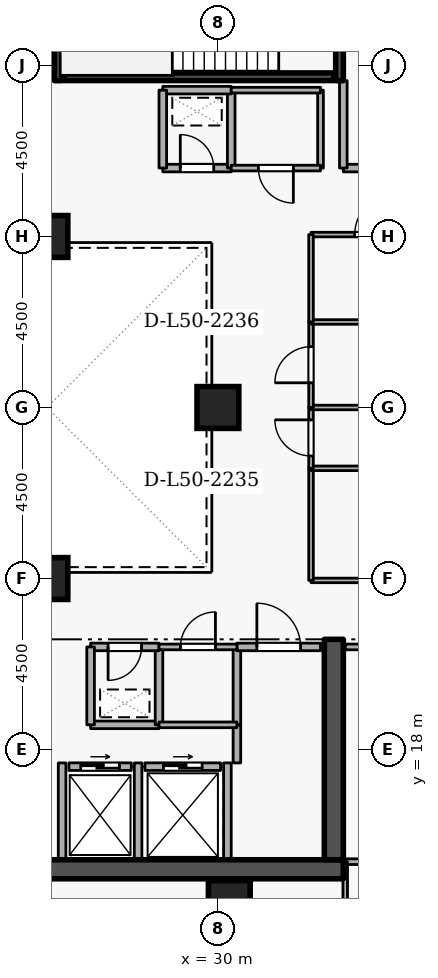
"""IFC4 building model, lengths in metres.
Left out: names, types, materials, properties, quantities, classifications, styles, units other than length and angle.
Written with IfcOpenShell. Run it as: python <this file> out.ifc"""

import sys

from ifc_helpers import new_model, si_unit, direction, frame, frame_2d, origin, origin_2d, place, context, subcontext, project, spatial, rectangle, extrude, element, fill, save


model = new_model("IFC4")
c1 = context("Model", 3, precision=1e-05, world=origin(), true_north=direction((0.0, 1.0)))
c2 = subcontext(c1, "Body", "Model", "MODEL_VIEW")
j1 = project(units=[si_unit("LENGTHUNIT", "METRE"), si_unit("PLANEANGLEUNIT", "RADIAN")], contexts=[c1])
p1 = place(None, origin())
s1 = spatial("IfcSite", under=j1, at=p1, CompositionType="ELEMENT")
p2 = place(p1, origin())
s2 = spatial("IfcBuilding", under=s1, at=p2, CompositionType="ELEMENT")
p3 = place(p2, frame((0.0, 0.0, 189.3)))
s3 = spatial("IfcBuildingStorey", under=s2, at=p3, CompositionType="ELEMENT", Elevation=189.3)
p4 = place(p3, frame((17.7, 14.85, 0.0), z_axis=(0.0, 0.0, 1.0), x_axis=(1.0, 0.0, 0.0)))
e1 = element("IfcWall", 1, at=p4, inside=s3, PredefinedType="SHEAR", context=c2, shape_type="SweptSolid", body=[
    extrude(rectangle(XDim=15.6, YDim=0.5, at=frame_2d((7.8, 0.0))), origin(), (0.0, 0.0, 1.0), 3.6),
])
p5 = place(p3, frame((33.05, 15.1, 0.0), z_axis=(0.0, 0.0, 1.0), x_axis=(0.0, 1.0, 0.0)))
e2 = element("IfcWall", 2, at=p5, inside=s3, PredefinedType="SHEAR", context=c2, shape_type="SweptSolid", body=[
    extrude(rectangle(XDim=5.8, YDim=0.5, at=frame_2d((2.9, 0.0))), origin(), (0.0, 0.0, 1.0), 3.6),
])
for number, where, z_axis, x_axis in (
    (3, (30.3, 14.0, 0.0), (0.0, 0.0, 1.0), (1.0, 0.0, 0.0)),
    (4, (25.5, 22.5, 0.0), (0.0, 0.0, 1.0), (1.0, 0.0, 0.0)),
    (5, (25.5, 31.5, 0.0), (0.0, 0.0, 1.0), (1.0, 0.0, 0.0)),
    (6, (30.0, 27.0, 0.0), (0.0, 0.0, 1.0), (1.0, 0.0, 0.0)),
):
    element("IfcColumn", number, at=place(p3, frame(where, z_axis=z_axis, x_axis=x_axis)), inside=s3, PredefinedType="COLUMN", context=c2, shape_type="SweptSolid", body=[
        extrude(rectangle(XDim=1.1, YDim=1.1, at=origin_2d()), origin(), (0.0, 0.0, 1.0), 3.6),
    ])
p6 = place(p3, frame((26.08, 17.55, 0.0), z_axis=(0.0, 0.0, 1.0), x_axis=(1.0, 0.0, 0.0)))
e7 = element("IfcWall", 7, at=p6, inside=s3, PredefinedType="STANDARD", context=c2, shape_type="SweptSolid", body=[
    extrude(rectangle(XDim=1.64, YDim=0.2, at=frame_2d((0.82, 0.0))), origin(), (0.0, 0.0, 1.0), 3.34),
])
p7 = place(p6, frame((0.31, 0.0, 0.0)))
e8 = element("IfcOpeningElement", 8, at=p7, cuts=e7, PredefinedType="OPENING", context=c2, shape_type="SweptSolid", body=[
    extrude(rectangle(XDim=1.02, YDim=2.06, at=frame_2d((0.51, 1.03))), frame((0.0, 0.11, 0.0), z_axis=(0.0, -1.0, 0.0), x_axis=(1.0, 0.0, 0.0)), (0.0, 0.0, 1.0), 0.22),
])
p8 = place(p3, frame((28.08, 17.55, 0.0), z_axis=(0.0, 0.0, 1.0), x_axis=(1.0, 0.0, 0.0)))
e9 = element("IfcWall", 9, at=p8, inside=s3, PredefinedType="STANDARD", context=c2, shape_type="SweptSolid", body=[
    extrude(rectangle(XDim=1.99, YDim=0.2, at=frame_2d((0.995, 0.0))), origin(), (0.0, 0.0, 1.0), 3.34),
])
p9 = place(p8, frame((0.485, 0.0, 0.0)))
e10 = element("IfcOpeningElement", 10, at=p9, cuts=e9, PredefinedType="OPENING", context=c2, shape_type="SweptSolid", body=[
    extrude(rectangle(XDim=1.02, YDim=2.06, at=frame_2d((0.51, 1.03))), frame((0.0, 0.11, 0.0), z_axis=(0.0, -1.0, 0.0), x_axis=(1.0, 0.0, 0.0)), (0.0, 0.0, 1.0), 0.22),
])
for number, where, z_axis, x_axis in (
    (11, (27.9, 15.112, 0.0), (0.0, 0.0, 1.0), (0.0, 1.0, 0.0)),
    (12, (25.9, 15.112, 0.0), (0.0, 0.0, 1.0), (0.0, 1.0, 0.0)),
    (13, (30.25, 15.112, 0.0), (0.0, 0.0, 1.0), (0.0, 1.0, 0.0)),
):
    element("IfcWall", number, at=place(p3, frame(where, z_axis=z_axis, x_axis=x_axis)), inside=s3, PredefinedType="STANDARD", context=c2, shape_type="SweptSolid", body=[
        extrude(rectangle(XDim=2.536, YDim=0.2, at=frame_2d((1.268, 0.0))), origin(), (0.0, 0.0, 1.0), 3.34),
    ])
p10 = place(p3, frame((33.2, 38.95, 0.0), z_axis=(0.0, 0.0, 1.0), x_axis=(0.0, -1.0, 0.0)))
e14 = element("IfcWall", 14, at=p10, inside=s3, PredefinedType="SHEAR", context=c2, shape_type="SweptSolid", body=[
    extrude(rectangle(XDim=3.35, YDim=0.2, at=frame_2d((1.675, 0.0))), origin(), (0.0, 0.0, 1.0), 3.6),
])
p11 = place(p10, frame((1.125, 0.0, 0.0)))
e15 = element("IfcOpeningElement", 15, at=p11, cuts=e14, PredefinedType="OPENING", context=c2, shape_type="SweptSolid", body=[
    extrude(rectangle(XDim=1.1, YDim=2.1, at=frame_2d((0.55, 1.05))), frame((0.0, 0.11, 0.0), z_axis=(0.0, -1.0, 0.0), x_axis=(1.0, 0.0, 0.0)), (0.0, 0.0, 1.0), 0.22),
])
p12 = place(p3, frame((25.8, 35.6, 0.0), z_axis=(0.0, 0.0, 1.0), x_axis=(0.0, 1.0, 0.0)))
e16 = element("IfcWall", 16, at=p12, inside=s3, PredefinedType="SHEAR", context=c2, shape_type="SweptSolid", body=[
    extrude(rectangle(XDim=3.35, YDim=0.2, at=frame_2d((1.675, 0.0))), origin(), (0.0, 0.0, 1.0), 3.6),
])
p13 = place(p3, frame((25.95, 35.703, 0.0), z_axis=(0.0, 0.0, 1.0), x_axis=(1.0, 0.0, 0.0)))
e17 = element("IfcWall", 17, at=p13, inside=s3, PredefinedType="SHEAR", context=c2, shape_type="SweptSolid", body=[
    extrude(rectangle(XDim=7.1, YDim=0.2, at=frame_2d((3.55, 0.0))), origin(), (0.0, 0.0, 1.0), 3.6),
])
p14 = place(p3, frame((33.3, 33.3, 0.0), z_axis=(0.0, 0.0, 1.0), x_axis=(1.0, 0.0, 0.0)))
e18 = element("IfcWall", 18, at=p14, inside=s3, PredefinedType="STANDARD", context=c2, shape_type="SweptSolid", body=[
    extrude(rectangle(XDim=2.5, YDim=0.2, at=frame_2d((1.25, 0.0))), origin(), (0.0, 0.0, 1.0), 3.34),
])
p15 = place(p14, frame((0.675, 0.0, 0.0)))
e19 = element("IfcOpeningElement", 19, at=p15, cuts=e18, PredefinedType="OPENING", context=c2, shape_type="SweptSolid", body=[
    extrude(rectangle(XDim=1.15, YDim=2.1, at=frame_2d((0.575, 1.05))), frame((0.0, 0.11, 0.0), z_axis=(0.0, -1.0, 0.0), x_axis=(1.0, 0.0, 0.0)), (0.0, 0.0, 1.0), 0.22),
])
p16 = place(p3, frame((33.3, 35.6, 0.0), z_axis=(0.0, 0.0, 1.0), x_axis=(0.0, -1.0, 0.0)))
e20 = element("IfcWall", 20, at=p16, inside=s3, PredefinedType="STANDARD", context=c2, shape_type="SweptSolid", body=[
    extrude(rectangle(XDim=2.3, YDim=0.2, at=frame_2d((1.15, 0.0))), origin(), (0.0, 0.0, 1.0), 2.545),
])
p17 = place(p3, frame((26.65, 18.65, 0.0), z_axis=(0.0, 0.0, 1.0), x_axis=(1.0, 0.0, 0.0)))
e21 = element("IfcWall", 21, at=p17, inside=s3, PredefinedType="STANDARD", context=c2, shape_type="SweptSolid", body=[
    extrude(rectangle(XDim=1.8, YDim=0.2, at=frame_2d((0.9, 0.0))), origin(), (0.0, 0.0, 1.0), 3.34),
])
p18 = place(p3, frame((28.45, 18.65, 0.0), z_axis=(0.0, 0.0, 1.0), x_axis=(0.0, 1.0, 0.0)))
e22 = element("IfcWall", 22, at=p18, inside=s3, PredefinedType="STANDARD", context=c2, shape_type="SweptSolid", body=[
    extrude(rectangle(XDim=2.05, YDim=0.2, at=frame_2d((1.025, 0.0))), origin(), (0.0, 0.0, 1.0), 3.34),
])
p19 = place(p3, frame((28.45, 20.7, 0.0), z_axis=(0.0, 0.0, 1.0), x_axis=(-1.0, 0.0, 0.0)))
e23 = element("IfcWall", 23, at=p19, inside=s3, PredefinedType="STANDARD", context=c2, shape_type="SweptSolid", body=[
    extrude(rectangle(XDim=1.8, YDim=0.2, at=frame_2d((0.9, 0.0))), origin(), (0.0, 0.0, 1.0), 3.34),
])
p20 = place(p19, frame((0.46, 0.0, 0.0)))
e24 = element("IfcOpeningElement", 24, at=p20, cuts=e23, PredefinedType="OPENING", context=c2, shape_type="SweptSolid", body=[
    extrude(rectangle(XDim=0.88, YDim=2.04, at=frame_2d((0.44, 1.02))), frame((0.0, 0.11, 0.0), z_axis=(0.0, -1.0, 0.0), x_axis=(1.0, 0.0, 0.0)), (0.0, 0.0, 1.0), 0.22),
])
p21 = place(p3, frame((26.65, 20.7, 0.0), z_axis=(0.0, 0.0, 1.0), x_axis=(0.0, -1.0, 0.0)))
e25 = element("IfcWall", 25, at=p21, inside=s3, PredefinedType="STANDARD", context=c2, shape_type="SweptSolid", body=[
    extrude(rectangle(XDim=2.05, YDim=0.2, at=frame_2d((1.025, 0.0))), origin(), (0.0, 0.0, 1.0), 3.34),
])
p22 = place(p3, frame((28.55, 33.3, 0.0), z_axis=(0.0, 0.0, 1.0), x_axis=(1.0, 0.0, 0.0)))
e26 = element("IfcWall", 26, at=p22, inside=s3, PredefinedType="STANDARD", context=c2, shape_type="SweptSolid", body=[
    extrude(rectangle(XDim=1.8, YDim=0.2, at=frame_2d((0.9, 0.0))), origin(), (0.0, 0.0, 1.0), 3.34),
])
p23 = place(p22, frame((0.46, 0.0, 0.0)))
e27 = element("IfcOpeningElement", 27, at=p23, cuts=e26, PredefinedType="OPENING", context=c2, shape_type="SweptSolid", body=[
    extrude(rectangle(XDim=0.88, YDim=2.04, at=frame_2d((0.44, 1.02))), frame((0.0, 0.11, 0.0), z_axis=(0.0, -1.0, 0.0), x_axis=(1.0, 0.0, 0.0)), (0.0, 0.0, 1.0), 0.22),
])
p24 = place(p3, frame((30.35, 33.3, 0.0), z_axis=(0.0, 0.0, 1.0), x_axis=(0.0, 1.0, 0.0)))
e28 = element("IfcWall", 28, at=p24, inside=s3, PredefinedType="STANDARD", context=c2, shape_type="SweptSolid", body=[
    extrude(rectangle(XDim=2.05, YDim=0.2, at=frame_2d((1.025, 0.0))), origin(), (0.0, 0.0, 1.0), 3.34),
])
p25 = place(p3, frame((30.35, 35.35, 0.0), z_axis=(0.0, 0.0, 1.0), x_axis=(-1.0, 0.0, 0.0)))
e29 = element("IfcWall", 29, at=p25, inside=s3, PredefinedType="STANDARD", context=c2, shape_type="SweptSolid", body=[
    extrude(rectangle(XDim=1.8, YDim=0.2, at=frame_2d((0.9, 0.0))), origin(), (0.0, 0.0, 1.0), 3.34),
])
p26 = place(p3, frame((28.55, 35.35, 0.0), z_axis=(0.0, 0.0, 1.0), x_axis=(0.0, -1.0, 0.0)))
e30 = element("IfcWall", 30, at=p26, inside=s3, PredefinedType="STANDARD", context=c2, shape_type="SweptSolid", body=[
    extrude(rectangle(XDim=2.05, YDim=0.2, at=frame_2d((1.025, 0.0))), origin(), (0.0, 0.0, 1.0), 3.34),
])
p27 = place(p3, frame((30.5, 17.648, 0.0), z_axis=(0.0, 0.0, 1.0), x_axis=(0.0, 1.0, 0.0)))
e31 = element("IfcWall", 31, at=p27, inside=s3, PredefinedType="STANDARD", context=c2, shape_type="SweptSolid", body=[
    extrude(rectangle(XDim=1.002, YDim=0.2, at=frame_2d((0.501, 0.0))), origin(), (0.0, 0.0, 1.0), 3.34),
])
p28 = place(p3, frame((30.5, 18.65, 0.0), z_axis=(0.0, 0.0, 1.0), x_axis=(0.0, 1.0, 0.0)))
e32 = element("IfcWall", 32, at=p28, inside=s3, PredefinedType="STANDARD", context=c2, shape_type="SweptSolid", body=[
    extrude(rectangle(XDim=2.05, YDim=0.2, at=frame_2d((1.025, 0.0))), origin(), (0.0, 0.0, 1.0), 3.34),
])
p29 = place(p3, frame((30.5, 20.7, 0.0), z_axis=(0.0, 0.0, 1.0), x_axis=(1.0, 0.0, 0.0)))
e33 = element("IfcWall", 33, at=p29, inside=s3, PredefinedType="STANDARD", context=c2, shape_type="SweptSolid", body=[
    extrude(rectangle(XDim=2.2, YDim=0.2, at=frame_2d((1.1, 0.0))), origin(), (0.0, 0.0, 1.0), 3.34),
])
p30 = place(p29, frame((0.525, 0.0, 0.0)))
e34 = element("IfcOpeningElement", 34, at=p30, cuts=e33, PredefinedType="OPENING", context=c2, shape_type="SweptSolid", body=[
    extrude(rectangle(XDim=1.15, YDim=2.1, at=frame_2d((0.575, 1.05))), frame((0.0, 0.11, 0.0), z_axis=(0.0, -1.0, 0.0), x_axis=(1.0, 0.0, 0.0)), (0.0, 0.0, 1.0), 0.22),
])
p31 = place(p3, frame((30.5, 18.65, 0.0), z_axis=(0.0, 0.0, 1.0), x_axis=(-1.0, 0.0, 0.0)))
e35 = element("IfcWall", 35, at=p31, inside=s3, PredefinedType="PARTITIONING", context=c2, shape_type="SweptSolid", body=[
    extrude(rectangle(XDim=2.05, YDim=0.15, at=frame_2d((1.025, 0.0))), origin(), (0.0, 0.0, 1.0), 3.34),
])
p32 = place(p3, frame((28.45, 20.7, 0.0), z_axis=(0.0, 0.0, 1.0), x_axis=(1.0, 0.0, 0.0)))
e36 = element("IfcWall", 36, at=p32, inside=s3, PredefinedType="PARTITIONING", context=c2, shape_type="SweptSolid", body=[
    extrude(rectangle(XDim=2.05, YDim=0.15, at=frame_2d((1.025, 0.0))), origin(), (0.0, 0.0, 1.0), 3.34),
])
p33 = place(p32, frame((0.565, 0.0, 0.0)))
e37 = element("IfcOpeningElement", 37, at=p33, cuts=e36, PredefinedType="OPENING", context=c2, shape_type="SweptSolid", body=[
    extrude(rectangle(XDim=0.92, YDim=2.08, at=frame_2d((0.46, 1.04))), frame((0.0, 0.085, 0.0), z_axis=(0.0, -1.0, 0.0), x_axis=(1.0, 0.0, 0.0)), (0.0, 0.0, 1.0), 0.17),
])
p34 = place(p3, frame((32.7, 35.35, 0.0), z_axis=(0.0, 0.0, 1.0), x_axis=(0.0, -1.0, 0.0)))
e38 = element("IfcWall", 38, at=p34, inside=s3, PredefinedType="PARTITIONING", context=c2, shape_type="SweptSolid", body=[
    extrude(rectangle(XDim=2.05, YDim=0.15, at=frame_2d((1.025, 0.0))), origin(), (0.0, 0.0, 1.0), 2.545),
])
p35 = place(p3, frame((32.7, 33.3, 0.0), z_axis=(0.0, 0.0, 1.0), x_axis=(-1.0, 0.0, 0.0)))
e39 = element("IfcWall", 39, at=p35, inside=s3, PredefinedType="PARTITIONING", context=c2, shape_type="SweptSolid", body=[
    extrude(rectangle(XDim=2.35, YDim=0.15, at=frame_2d((1.175, 0.0))), origin(), (0.0, 0.0, 1.0), 3.34),
])
p36 = place(p35, frame((0.715, 0.0, 0.0)))
e40 = element("IfcOpeningElement", 40, at=p36, cuts=e39, PredefinedType="OPENING", context=c2, shape_type="SweptSolid", body=[
    extrude(rectangle(XDim=0.92, YDim=2.08, at=frame_2d((0.46, 1.04))), frame((0.0, 0.085, 0.0), z_axis=(0.0, -1.0, 0.0), x_axis=(1.0, 0.0, 0.0)), (0.0, 0.0, 1.0), 0.17),
])
p37 = place(p3, frame((30.35, 35.35, 0.0), z_axis=(0.0, 0.0, 1.0), x_axis=(1.0, 0.0, 0.0)))
e41 = element("IfcWall", 41, at=p37, inside=s3, PredefinedType="PARTITIONING", context=c2, shape_type="SweptSolid", body=[
    extrude(rectangle(XDim=2.35, YDim=0.15, at=frame_2d((1.175, 0.0))), origin(), (0.0, 0.0, 1.0), 3.34),
])
p38 = place(p3, frame((35.45, 15.05, 0.0), z_axis=(0.0, 0.0, 1.0), x_axis=(-1.0, 0.0, 0.0)))
e42 = element("IfcWall", 42, at=p38, inside=s3, PredefinedType="PARTITIONING", context=c2, shape_type="SweptSolid", body=[
    extrude(rectangle(XDim=2.1, YDim=0.15, at=frame_2d((1.05, 0.0))), origin(), (0.0, 0.0, 1.0), 3.34),
])
p39 = place(p3, frame((33.35, 20.7, 0.0), z_axis=(0.0, 0.0, 1.0), x_axis=(1.0, 0.0, 0.0)))
e43 = element("IfcWall", 43, at=p39, inside=s3, PredefinedType="PARTITIONING", context=c2, shape_type="SweptSolid", body=[
    extrude(rectangle(XDim=2.1, YDim=0.15, at=frame_2d((1.05, 0.0))), origin(), (0.0, 0.0, 1.0), 3.34),
])
p40 = place(p39, frame((0.575, 0.0, 0.0)))
e44 = element("IfcOpeningElement", 44, at=p40, cuts=e43, PredefinedType="OPENING", context=c2, shape_type="SweptSolid", body=[
    extrude(rectangle(XDim=0.95, YDim=2.1, at=frame_2d((0.475, 1.05))), frame((0.0, 0.085, 0.0), z_axis=(0.0, -1.0, 0.0), x_axis=(1.0, 0.0, 0.0)), (0.0, 0.0, 1.0), 0.17),
])
p41 = place(p3, frame((37.75, 22.45, 0.0), z_axis=(0.0, 0.0, 1.0), x_axis=(-1.0, 0.0, 0.0)))
e45 = element("IfcWall", 45, at=p41, inside=s3, PredefinedType="PARTITIONING", context=c2, shape_type="SweptSolid", body=[
    extrude(rectangle(XDim=5.3, YDim=0.12, at=frame_2d((2.65, 0.0))), origin(), (0.0, 0.0, 1.0), 3.34),
])
p42 = place(p41, frame((2.125, 0.0, 0.0)))
e46 = element("IfcOpeningElement", 46, at=p42, cuts=e45, PredefinedType="OPENING", context=c2, shape_type="SweptSolid", body=[
    extrude(rectangle(XDim=1.05, YDim=2.1, at=frame_2d((0.525, 1.05))), frame((0.0, 0.07, 0.0), z_axis=(0.0, -1.0, 0.0), x_axis=(1.0, 0.0, 0.0)), (0.0, 0.0, 1.0), 0.14),
])
p43 = place(p3, frame((32.45, 22.45, 0.0), z_axis=(0.0, 0.0, 1.0), x_axis=(0.0, 1.0, 0.0)))
e47 = element("IfcWall", 47, at=p43, inside=s3, PredefinedType="PARTITIONING", context=c2, shape_type="SweptSolid", body=[
    extrude(rectangle(XDim=2.95, YDim=0.12, at=frame_2d((1.475, 0.0))), origin(), (0.0, 0.0, 1.0), 3.34),
])
p44 = place(p3, frame((32.45, 25.4, 0.0), z_axis=(0.0, 0.0, 1.0), x_axis=(1.0, 0.0, 0.0)))
e48 = element("IfcWall", 48, at=p44, inside=s3, PredefinedType="PARTITIONING", context=c2, shape_type="SweptSolid", body=[
    extrude(rectangle(XDim=16.77, YDim=0.12, at=frame_2d((8.385, 0.0))), origin(), (0.0, 0.0, 1.0), 3.34),
])
p45 = place(p3, frame((33.35, 9.28, 0.0), z_axis=(0.0, 0.0, 1.0), x_axis=(0.0, 1.0, 0.0)))
e49 = element("IfcWall", 49, at=p45, inside=s3, PredefinedType="PARTITIONING", context=c2, shape_type="SweptSolid", body=[
    extrude(rectangle(XDim=5.77, YDim=0.12, at=frame_2d((2.885, 0.0))), origin(), (0.0, 0.0, 1.0), 2.545),
])
p46 = place(p3, frame((32.45, 25.4, 0.0), z_axis=(0.0, 0.0, 1.0), x_axis=(0.0, 1.0, 0.0)))
e50 = element("IfcWall", 50, at=p46, inside=s3, PredefinedType="PARTITIONING", context=c2, shape_type="SweptSolid", body=[
    extrude(rectangle(XDim=1.6, YDim=0.12, at=frame_2d((0.8, 0.0))), origin(), (0.0, 0.0, 1.0), 3.34),
])
p47 = place(p46, frame((0.325, 0.0, 0.0)))
e51 = element("IfcOpeningElement", 51, at=p47, cuts=e50, PredefinedType="OPENING", context=c2, shape_type="SweptSolid", body=[
    extrude(rectangle(XDim=0.95, YDim=2.1, at=frame_2d((0.475, 1.05))), frame((0.0, 0.07, 0.0), z_axis=(0.0, -1.0, 0.0), x_axis=(1.0, 0.0, 0.0)), (0.0, 0.0, 1.0), 0.14),
])
p48 = place(p3, frame((32.45, 27.0, 0.0), z_axis=(0.0, 0.0, 1.0), x_axis=(1.0, 0.0, 0.0)))
e52 = element("IfcWall", 52, at=p48, inside=s3, PredefinedType="PARTITIONING", context=c2, shape_type="SweptSolid", body=[
    extrude(rectangle(XDim=16.77, YDim=0.12, at=frame_2d((8.385, 0.0))), origin(), (0.0, 0.0, 1.0), 2.878),
])
p49 = place(p3, frame((32.45, 27.0, 0.0), z_axis=(0.0, 0.0, 1.0), x_axis=(0.0, 1.0, 0.0)))
e53 = element("IfcWall", 53, at=p49, inside=s3, PredefinedType="PARTITIONING", context=c2, shape_type="SweptSolid", body=[
    extrude(rectangle(XDim=2.25, YDim=0.12, at=frame_2d((1.125, 0.0))), origin(), (0.0, 0.0, 1.0), 3.34),
])
p50 = place(p49, frame((0.65, 0.0, 0.0)))
e54 = element("IfcOpeningElement", 54, at=p50, cuts=e53, PredefinedType="OPENING", context=c2, shape_type="SweptSolid", body=[
    extrude(rectangle(XDim=0.95, YDim=2.1, at=frame_2d((0.475, 1.05))), frame((0.0, 0.07, 0.0), z_axis=(0.0, -1.0, 0.0), x_axis=(1.0, 0.0, 0.0)), (0.0, 0.0, 1.0), 0.14),
])
p51 = place(p3, frame((32.45, 29.25, 0.0), z_axis=(0.0, 0.0, 1.0), x_axis=(1.0, 0.0, 0.0)))
e55 = element("IfcWall", 55, at=p51, inside=s3, PredefinedType="PARTITIONING", context=c2, shape_type="SweptSolid", body=[
    extrude(rectangle(XDim=16.77, YDim=0.12, at=frame_2d((8.385, 0.0))), origin(), (0.0, 0.0, 1.0), 3.34),
])
p52 = place(p3, frame((32.45, 31.55, 0.0), z_axis=(0.0, 0.0, 1.0), x_axis=(1.0, 0.0, 0.0)))
e56 = element("IfcWall", 56, at=p52, inside=s3, PredefinedType="PARTITIONING", context=c2, shape_type="SweptSolid", body=[
    extrude(rectangle(XDim=3.35, YDim=0.12, at=frame_2d((1.675, 0.0))), origin(), (0.0, 0.0, 1.0), 3.34),
])
p53 = place(p52, frame((1.15, 0.0, 0.0)))
e57 = element("IfcOpeningElement", 57, at=p53, cuts=e56, PredefinedType="OPENING", context=c2, shape_type="SweptSolid", body=[
    extrude(rectangle(XDim=1.05, YDim=2.1, at=frame_2d((0.525, 1.05))), frame((0.0, 0.07, 0.0), z_axis=(0.0, -1.0, 0.0), x_axis=(1.0, 0.0, 0.0)), (0.0, 0.0, 1.0), 0.14),
])
p54 = place(p3, frame((32.45, 29.25, 0.0), z_axis=(0.0, 0.0, 1.0), x_axis=(0.0, 1.0, 0.0)))
e58 = element("IfcWall", 58, at=p54, inside=s3, PredefinedType="PARTITIONING", context=c2, shape_type="SweptSolid", body=[
    extrude(rectangle(XDim=2.3, YDim=0.12, at=frame_2d((1.15, 0.0))), origin(), (0.0, 0.0, 1.0), 3.34),
])
p55 = place(p7, origin())
e59 = element("IfcDoor", 59, at=p55, inside=s3, OperationType="SLIDING_TO_LEFT", PredefinedType="DOOR", context=c2, shape_type="SweptSolid", body=[
    extrude(rectangle(XDim=1.02, YDim=2.06, at=frame_2d((0.51, 1.03))), frame((0.0, 0.025, 0.0), z_axis=(0.0, -1.0, 0.0), x_axis=(1.0, 0.0, 0.0)), (0.0, 0.0, 1.0), 0.05),
])
fill(e8, e59)
p56 = place(p9, origin())
e60 = element("IfcDoor", 60, at=p56, inside=s3, OperationType="SLIDING_TO_LEFT", PredefinedType="DOOR", context=c2, shape_type="SweptSolid", body=[
    extrude(rectangle(XDim=1.02, YDim=2.06, at=frame_2d((0.51, 1.03))), frame((0.0, 0.025, 0.0), z_axis=(0.0, -1.0, 0.0), x_axis=(1.0, 0.0, 0.0)), (0.0, 0.0, 1.0), 0.05),
])
fill(e10, e60)
p57 = place(p20, origin())
e61 = element("IfcDoor", 61, at=p57, inside=s3, OperationType="SINGLE_SWING_RIGHT", PredefinedType="DOOR", context=c2, shape_type="SweptSolid", body=[
    extrude(rectangle(XDim=0.88, YDim=2.04, at=frame_2d((0.44, 1.02))), frame((0.0, 0.025, 0.0), z_axis=(0.0, -1.0, 0.0), x_axis=(1.0, 0.0, 0.0)), (0.0, 0.0, 1.0), 0.05),
])
fill(e24, e61)
p58 = place(p23, origin())
e62 = element("IfcDoor", 62, at=p58, inside=s3, OperationType="SINGLE_SWING_LEFT", PredefinedType="DOOR", context=c2, shape_type="SweptSolid", body=[
    extrude(rectangle(XDim=0.88, YDim=2.04, at=frame_2d((0.44, 1.02))), frame((0.0, 0.025, 0.0), z_axis=(0.0, -1.0, 0.0), x_axis=(1.0, 0.0, 0.0)), (0.0, 0.0, 1.0), 0.05),
])
fill(e27, e62)
p59 = place(p33, origin())
e63 = element("IfcDoor", 63, at=p59, inside=s3, OperationType="SINGLE_SWING_RIGHT", PredefinedType="DOOR", context=c2, shape_type="SweptSolid", body=[
    extrude(rectangle(XDim=0.92, YDim=2.08, at=frame_2d((0.46, 1.04))), frame((0.0, 0.025, 0.0), z_axis=(0.0, -1.0, 0.0), x_axis=(1.0, 0.0, 0.0)), (0.0, 0.0, 1.0), 0.05),
])
fill(e37, e63)
p60 = place(p30, origin())
e64 = element("IfcDoor", 64, at=p60, inside=s3, OperationType="SINGLE_SWING_LEFT", PredefinedType="DOOR", context=c2, shape_type="SweptSolid", body=[
    extrude(rectangle(XDim=1.15, YDim=2.1, at=frame_2d((0.575, 1.05))), frame((0.0, 0.025, 0.0), z_axis=(0.0, -1.0, 0.0), x_axis=(1.0, 0.0, 0.0)), (0.0, 0.0, 1.0), 0.05),
])
fill(e34, e64)
p61 = place(p36, origin())
e65 = element("IfcDoor", 65, at=p61, inside=s3, OperationType="SINGLE_SWING_LEFT", PredefinedType="DOOR", context=c2, shape_type="SweptSolid", body=[
    extrude(rectangle(XDim=0.92, YDim=2.08, at=frame_2d((0.46, 1.04))), frame((0.0, 0.025, 0.0), z_axis=(0.0, -1.0, 0.0), x_axis=(1.0, 0.0, 0.0)), (0.0, 0.0, 1.0), 0.05),
])
fill(e40, e65)
p62 = place(p47, origin())
e66 = element("IfcDoor", 66, at=p62, inside=s3, OperationType="SINGLE_SWING_RIGHT", PredefinedType="DOOR", context=c2, shape_type="SweptSolid", body=[
    extrude(rectangle(XDim=0.95, YDim=2.1, at=frame_2d((0.475, 1.05))), frame((0.0, 0.025, 0.0), z_axis=(0.0, -1.0, 0.0), x_axis=(1.0, 0.0, 0.0)), (0.0, 0.0, 1.0), 0.05),
])
fill(e51, e66)
p63 = place(p50, origin())
e67 = element("IfcDoor", 67, at=p63, inside=s3, OperationType="SINGLE_SWING_LEFT", PredefinedType="DOOR", context=c2, shape_type="SweptSolid", body=[
    extrude(rectangle(XDim=0.95, YDim=2.1, at=frame_2d((0.475, 1.05))), frame((0.0, 0.025, 0.0), z_axis=(0.0, -1.0, 0.0), x_axis=(1.0, 0.0, 0.0)), (0.0, 0.0, 1.0), 0.05),
])
fill(e54, e67)
p64 = place(p53, origin())
e68 = element("IfcDoor", 68, at=p64, inside=s3, OperationType="SINGLE_SWING_RIGHT", PredefinedType="DOOR", context=c2, shape_type="SweptSolid", body=[
    extrude(rectangle(XDim=1.05, YDim=2.1, at=frame_2d((0.525, 1.05))), frame((0.0, 0.025, 0.0), z_axis=(0.0, -1.0, 0.0), x_axis=(1.0, 0.0, 0.0)), (0.0, 0.0, 1.0), 0.05),
])
fill(e57, e68)
save(model, sys.argv[1])
